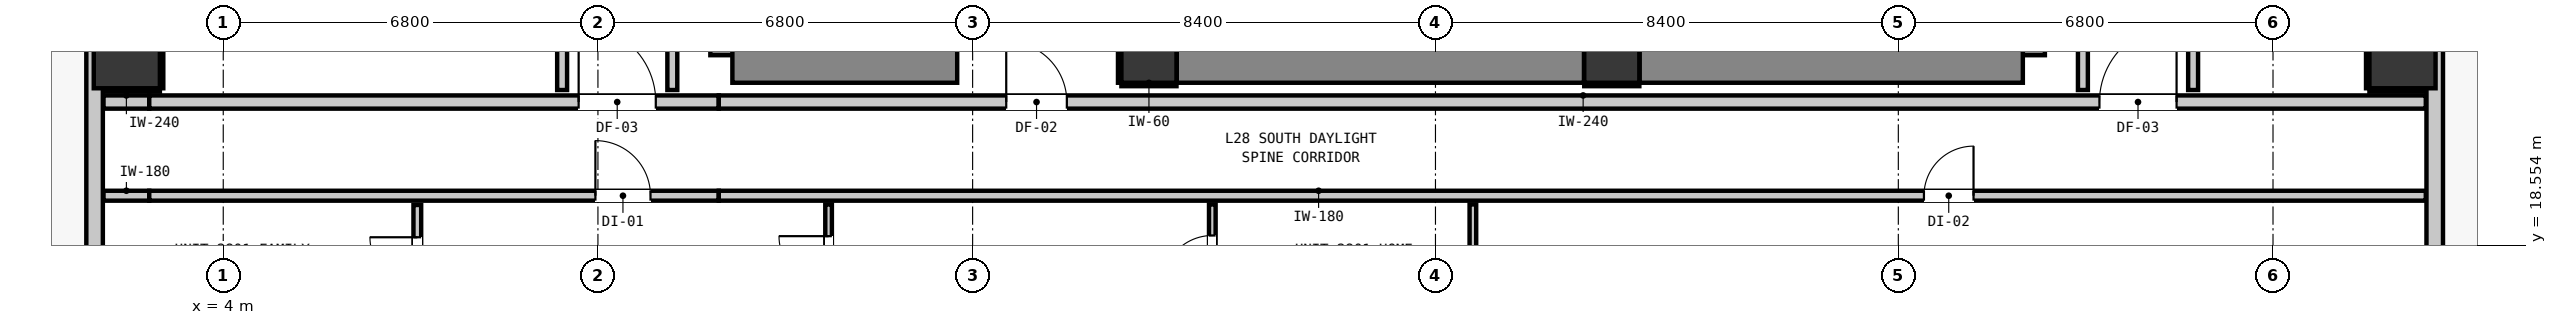
"""IFC4 building model, lengths in metres.
Left out: names, types, materials, properties, quantities, classifications, styles, units other than length and angle.
Written with IfcOpenShell. Run it as: python <this file> out.ifc"""

import sys

from ifc_helpers import new_model, si_unit, direction, frame, frame_2d, origin, origin_2d, place, context, subcontext, project, spatial, rectangle, extrude, element, fill, save


model = new_model("IFC4")
c1 = context("Model", 3, precision=1e-05, world=origin(), true_north=direction((0.0, 1.0)))
c2 = subcontext(c1, "Body", "Model", "MODEL_VIEW")
j1 = project(units=[si_unit("LENGTHUNIT", "METRE"), si_unit("PLANEANGLEUNIT", "RADIAN")], contexts=[c1])
p1 = place(None, origin())
s1 = spatial("IfcSite", under=j1, at=p1, CompositionType="ELEMENT")
p2 = place(p1, origin())
s2 = spatial("IfcBuilding", under=s1, at=p2, CompositionType="ELEMENT")
p3 = place(p2, frame((0.0, 0.0, 99.44)))
s3 = spatial("IfcBuildingStorey", under=s2, at=p3, CompositionType="ELEMENT", Elevation=99.44)
for number, where, z_axis, x_axis in (
    (1, (20.8, 22.0, 0.0), (0.0, 0.0, 1.0), (1.0, 0.0, 0.0)),
    (2, (29.2, 22.0, 0.0), (0.0, 0.0, 1.0), (1.0, 0.0, 0.0)),
):
    element("IfcColumn", number, at=place(p3, frame(where, z_axis=z_axis, x_axis=x_axis)), inside=s3, PredefinedType="COLUMN", context=c2, shape_type="SweptSolid", body=[
        extrude(rectangle(XDim=1.0, YDim=1.0, at=origin_2d()), origin(), (0.0, 0.0, 1.0), 3.32),
    ])
p4 = place(p3, frame((13.34, 22.0, 0.0), z_axis=(0.0, 0.0, 1.0), x_axis=(0.0, 1.0, 0.0)))
e3 = element("IfcWall", 3, at=p4, inside=s3, PredefinedType="SHEAR", context=c2, shape_type="SweptSolid", body=[
    extrude(rectangle(XDim=8.195, YDim=1.0, at=frame_2d((4.098, 0.0))), origin(), (0.0, 0.0, 1.0), 3.32),
])
p5 = place(p3, frame((13.24, 22.0, 0.0), z_axis=(0.0, 0.0, 1.0), x_axis=(1.0, 0.0, 0.0)))
e4 = element("IfcWall", 4, at=p5, inside=s3, PredefinedType="SHEAR", context=c2, shape_type="SweptSolid", body=[
    extrude(rectangle(XDim=4.08, YDim=1.0, at=frame_2d((2.04, 0.0))), origin(), (0.0, 0.0, 1.0), 3.32),
])
p6 = place(p3, frame((36.56, 22.0, 0.0), z_axis=(0.0, 0.0, 1.0), x_axis=(0.0, 1.0, 0.0)))
e5 = element("IfcWall", 5, at=p6, inside=s3, PredefinedType="SHEAR", context=c2, shape_type="SweptSolid", body=[
    extrude(rectangle(XDim=8.195, YDim=1.0, at=frame_2d((4.098, 0.0))), origin(), (0.0, 0.0, 1.0), 3.32),
])
p7 = place(p3, frame((29.705, 22.0, 0.0), z_axis=(0.0, 0.0, 1.0), x_axis=(1.0, 0.0, 0.0)))
e6 = element("IfcWall", 6, at=p7, inside=s3, PredefinedType="SHEAR", context=c2, shape_type="SweptSolid", body=[
    extrude(rectangle(XDim=6.955, YDim=1.0, at=frame_2d((3.478, 0.0))), origin(), (0.0, 0.0, 1.0), 3.32),
])
p8 = place(p3, frame((21.305, 22.0, 0.0), z_axis=(0.0, 0.0, 1.0), x_axis=(1.0, 0.0, 0.0)))
e7 = element("IfcWall", 7, at=p8, inside=s3, PredefinedType="SHEAR", context=c2, shape_type="SweptSolid", body=[
    extrude(rectangle(XDim=7.39, YDim=1.0, at=frame_2d((3.695, 0.0))), origin(), (0.0, 0.0, 1.0), 3.32),
])
for number, where, z_axis, x_axis in (
    (8, (2.25, 22.0, 0.0), (0.0, 0.0, 1.0), (1.0, 0.0, 0.0)),
    (9, (43.55, 22.0, 0.0), (0.0, 0.0, 1.0), (1.0, 0.0, 0.0)),
):
    element("IfcColumn", number, at=place(p3, frame(where, z_axis=z_axis, x_axis=x_axis)), inside=s3, PredefinedType="COLUMN", context=c2, shape_type="SweptSolid", body=[
        extrude(rectangle(XDim=1.2, YDim=1.2, at=origin_2d()), origin(), (0.0, 0.0, 1.0), 3.32),
    ])
p9 = place(p3, frame((1.665, 16.365, 0.0), z_axis=(0.0, 0.0, 1.0), x_axis=(0.0, 1.0, 0.0)))
e10 = element("IfcWall", 10, at=p9, inside=s3, PredefinedType="STANDARD", context=c2, shape_type="SweptSolid", body=[
    extrude(rectangle(XDim=34.67, YDim=0.3, at=frame_2d((17.335, 0.0))), origin(), (0.0, 0.0, 1.0), 3.06),
])
p10 = place(p9, frame((8.955, 0.0, 0.0)))
e11 = element("IfcOpeningElement", 11, at=p10, cuts=e10, PredefinedType="OPENING", context=c2, shape_type="SweptSolid", body=[
    extrude(rectangle(XDim=1.0, YDim=2.15, at=frame_2d((0.5, 1.075))), frame((0.0, 0.16, 0.0), z_axis=(0.0, -1.0, 0.0), x_axis=(1.0, 0.0, 0.0)), (0.0, 0.0, 1.0), 0.32),
])
p11 = place(p9, frame((31.033, 0.0, 0.85)))
e12 = element("IfcOpeningElement", 12, at=p11, cuts=e10, PredefinedType="OPENING", context=c2, shape_type="SweptSolid", body=[
    extrude(rectangle(XDim=0.9, YDim=1.5, at=frame_2d((0.45, 0.75))), frame((0.0, 0.16, 0.0), z_axis=(0.0, -1.0, 0.0), x_axis=(1.0, 0.0, 0.0)), (0.0, 0.0, 1.0), 0.32),
])
p12 = place(p9, frame((10.955, 0.0, 0.85)))
e13 = element("IfcOpeningElement", 13, at=p12, cuts=e10, PredefinedType="OPENING", context=c2, shape_type="SweptSolid", body=[
    extrude(rectangle(XDim=0.9, YDim=1.5, at=frame_2d((0.45, 0.75))), frame((0.0, 0.16, 0.0), z_axis=(0.0, -1.0, 0.0), x_axis=(1.0, 0.0, 0.0)), (0.0, 0.0, 1.0), 0.32),
])
p13 = place(p9, frame((15.485, 0.0, 0.85)))
e14 = element("IfcOpeningElement", 14, at=p13, cuts=e10, PredefinedType="OPENING", context=c2, shape_type="SweptSolid", body=[
    extrude(rectangle(XDim=0.9, YDim=1.5, at=frame_2d((0.45, 0.75))), frame((0.0, 0.16, 0.0), z_axis=(0.0, -1.0, 0.0), x_axis=(1.0, 0.0, 0.0)), (0.0, 0.0, 1.0), 0.32),
])
p14 = place(p3, frame((44.135, 51.035, 0.0), z_axis=(0.0, 0.0, 1.0), x_axis=(0.0, -1.0, 0.0)))
e15 = element("IfcWall", 15, at=p14, inside=s3, PredefinedType="STANDARD", context=c2, shape_type="SweptSolid", body=[
    extrude(rectangle(XDim=34.67, YDim=0.3, at=frame_2d((17.335, 0.0))), origin(), (0.0, 0.0, 1.0), 3.06),
])
p15 = place(p14, frame((0.901, 0.0, 0.0)))
e16 = element("IfcOpeningElement", 16, at=p15, cuts=e15, PredefinedType="OPENING", context=c2, shape_type="SweptSolid", body=[
    extrude(rectangle(XDim=1.0, YDim=2.15, at=frame_2d((0.5, 1.075))), frame((0.0, 0.16, 0.0), z_axis=(0.0, -1.0, 0.0), x_axis=(1.0, 0.0, 0.0)), (0.0, 0.0, 1.0), 0.32),
])
p16 = place(p14, frame((32.682, 0.0, 0.85)))
e17 = element("IfcOpeningElement", 17, at=p16, cuts=e15, PredefinedType="OPENING", context=c2, shape_type="SweptSolid", body=[
    extrude(rectangle(XDim=0.9, YDim=1.5, at=frame_2d((0.45, 0.75))), frame((0.0, 0.16, 0.0), z_axis=(0.0, -1.0, 0.0), x_axis=(1.0, 0.0, 0.0)), (0.0, 0.0, 1.0), 0.32),
])
p17 = place(p14, frame((23.323, 0.0, 0.85)))
e18 = element("IfcOpeningElement", 18, at=p17, cuts=e15, PredefinedType="OPENING", context=c2, shape_type="SweptSolid", body=[
    extrude(rectangle(XDim=0.9, YDim=1.5, at=frame_2d((0.45, 0.75))), frame((0.0, 0.16, 0.0), z_axis=(0.0, -1.0, 0.0), x_axis=(1.0, 0.0, 0.0)), (0.0, 0.0, 1.0), 0.32),
])
p18 = place(p3, frame((1.827, 21.15, 0.0), z_axis=(0.0, 0.0, 1.0), x_axis=(1.0, 0.0, 0.0)))
e19 = element("IfcWall", 19, at=p18, inside=s3, PredefinedType="PARTITIONING", context=c2, shape_type="SweptSolid", body=[
    extrude(rectangle(XDim=0.83, YDim=0.24, at=frame_2d((0.415, 0.0))), origin(), (0.0, 0.0, 1.0), 3.06),
])
p19 = place(p3, frame((2.657, 21.15, 0.0), z_axis=(0.0, 0.0, 1.0), x_axis=(1.0, 0.0, 0.0)))
e20 = element("IfcWall", 20, at=p19, inside=s3, PredefinedType="PARTITIONING", context=c2, shape_type="SweptSolid", body=[
    extrude(rectangle(XDim=10.336, YDim=0.24, at=frame_2d((5.168, 0.0))), origin(), (0.0, 0.0, 1.0), 2.445),
])
p20 = place(p19, frame((7.793, 0.0, 0.0)))
e21 = element("IfcOpeningElement", 21, at=p20, cuts=e20, PredefinedType="OPENING", context=c2, shape_type="SweptSolid", body=[
    extrude(rectangle(XDim=1.4, YDim=2.15, at=frame_2d((0.7, 1.075))), frame((0.0, 0.13, 0.0), z_axis=(0.0, -1.0, 0.0), x_axis=(1.0, 0.0, 0.0)), (0.0, 0.0, 1.0), 0.26),
])
p21 = place(p3, frame((12.993, 21.15, 0.0), z_axis=(0.0, 0.0, 1.0), x_axis=(1.0, 0.0, 0.0)))
e22 = element("IfcWall", 22, at=p21, inside=s3, PredefinedType="PARTITIONING", context=c2, shape_type="SweptSolid", body=[
    extrude(rectangle(XDim=30.98, YDim=0.24, at=frame_2d((15.49, 0.0))), origin(), (0.0, 0.0, 1.0), 3.06),
])
p22 = place(p21, frame((5.217, 0.0, 0.0)))
e23 = element("IfcOpeningElement", 23, at=p22, cuts=e22, PredefinedType="OPENING", context=c2, shape_type="SweptSolid", body=[
    extrude(rectangle(XDim=1.1, YDim=2.15, at=frame_2d((0.55, 1.075))), frame((0.0, 0.13, 0.0), z_axis=(0.0, -1.0, 0.0), x_axis=(1.0, 0.0, 0.0)), (0.0, 0.0, 1.0), 0.26),
])
p23 = place(p21, frame((25.057, 0.0, 0.0)))
e24 = element("IfcOpeningElement", 24, at=p23, cuts=e22, PredefinedType="OPENING", context=c2, shape_type="SweptSolid", body=[
    extrude(rectangle(XDim=1.4, YDim=2.15, at=frame_2d((0.7, 1.075))), frame((0.0, 0.13, 0.0), z_axis=(0.0, -1.0, 0.0), x_axis=(1.0, 0.0, 0.0)), (0.0, 0.0, 1.0), 0.26),
])
p24 = place(p3, frame((1.827, 19.45, 0.0), z_axis=(0.0, 0.0, 1.0), x_axis=(1.0, 0.0, 0.0)))
e25 = element("IfcWall", 25, at=p24, inside=s3, PredefinedType="PARTITIONING", context=c2, shape_type="SweptSolid", body=[
    extrude(rectangle(XDim=0.83, YDim=0.18, at=frame_2d((0.415, 0.0))), origin(), (0.0, 0.0, 1.0), 3.06),
])
p25 = place(p3, frame((2.657, 19.45, 0.0), z_axis=(0.0, 0.0, 1.0), x_axis=(1.0, 0.0, 0.0)))
e26 = element("IfcWall", 26, at=p25, inside=s3, PredefinedType="PARTITIONING", context=c2, shape_type="SweptSolid", body=[
    extrude(rectangle(XDim=10.336, YDim=0.18, at=frame_2d((5.168, 0.0))), origin(), (0.0, 0.0, 1.0), 2.445),
])
p26 = place(p25, frame((8.097, 0.0, 0.0)))
e27 = element("IfcOpeningElement", 27, at=p26, cuts=e26, PredefinedType="OPENING", context=c2, shape_type="SweptSolid", body=[
    extrude(rectangle(XDim=1.0, YDim=2.15, at=frame_2d((0.5, 1.075))), frame((0.0, 0.1, 0.0), z_axis=(0.0, -1.0, 0.0), x_axis=(1.0, 0.0, 0.0)), (0.0, 0.0, 1.0), 0.2),
])
p27 = place(p3, frame((12.993, 19.45, 0.0), z_axis=(0.0, 0.0, 1.0), x_axis=(1.0, 0.0, 0.0)))
e28 = element("IfcWall", 28, at=p27, inside=s3, PredefinedType="PARTITIONING", context=c2, shape_type="SweptSolid", body=[
    extrude(rectangle(XDim=30.98, YDim=0.18, at=frame_2d((15.49, 0.0))), origin(), (0.0, 0.0, 1.0), 3.06),
])
p28 = place(p27, frame((21.872, 0.0, 0.0)))
e29 = element("IfcOpeningElement", 29, at=p28, cuts=e28, PredefinedType="OPENING", context=c2, shape_type="SweptSolid", body=[
    extrude(rectangle(XDim=0.9, YDim=2.1, at=frame_2d((0.45, 1.05))), frame((0.0, 0.1, 0.0), z_axis=(0.0, -1.0, 0.0), x_axis=(1.0, 0.0, 0.0)), (0.0, 0.0, 1.0), 0.2),
])
p29 = place(p3, frame((10.15, 21.368, 0.0), z_axis=(0.0, 0.0, 1.0), x_axis=(0.0, 1.0, 0.0)))
e30 = element("IfcWall", 30, at=p29, inside=s3, PredefinedType="PARTITIONING", context=c2, shape_type="SweptSolid", body=[
    extrude(rectangle(XDim=3.109, YDim=0.18, at=frame_2d((1.555, 0.0))), origin(), (0.0, 0.0, 1.0), 3.06),
])
for number, where, z_axis, x_axis in (
    (31, (12.15, 21.368, 0.0), (0.0, 0.0, 1.0), (0.0, 1.0, 0.0)),
    (32, (37.75, 21.368, 0.0), (0.0, 0.0, 1.0), (0.0, 1.0, 0.0)),
):
    element("IfcWall", number, at=place(p3, frame(where, z_axis=z_axis, x_axis=x_axis)), inside=s3, PredefinedType="PARTITIONING", context=c2, shape_type="SweptSolid", body=[
        extrude(rectangle(XDim=18.694, YDim=0.18, at=frame_2d((9.347, 0.0))), origin(), (0.0, 0.0, 1.0), 3.06),
    ])
p30 = place(p3, frame((39.75, 21.368, 0.0), z_axis=(0.0, 0.0, 1.0), x_axis=(0.0, 1.0, 0.0)))
e33 = element("IfcWall", 33, at=p30, inside=s3, PredefinedType="PARTITIONING", context=c2, shape_type="SweptSolid", body=[
    extrude(rectangle(XDim=3.109, YDim=0.18, at=frame_2d((1.555, 0.0))), origin(), (0.0, 0.0, 1.0), 3.06),
])
p31 = place(p3, frame((7.522, 17.255, 0.0), z_axis=(0.0, 0.0, 1.0), x_axis=(0.0, 1.0, 0.0)))
e34 = element("IfcWall", 34, at=p31, inside=s3, PredefinedType="PARTITIONING", context=c2, shape_type="SweptSolid", body=[
    extrude(rectangle(XDim=2.027, YDim=0.14, at=frame_2d((1.014, 0.0))), origin(), (0.0, 0.0, 1.0), 3.06),
])
p32 = place(p31, frame((0.581, 0.0, 0.0)))
e35 = element("IfcOpeningElement", 35, at=p32, cuts=e34, PredefinedType="OPENING", context=c2, shape_type="SweptSolid", body=[
    extrude(rectangle(XDim=0.86, YDim=2.02, at=frame_2d((0.43, 1.01))), frame((0.0, 0.08, 0.0), z_axis=(0.0, -1.0, 0.0), x_axis=(1.0, 0.0, 0.0)), (0.0, 0.0, 1.0), 0.16),
])
p33 = place(p3, frame((14.986, 17.245, 0.0), z_axis=(0.0, 0.0, 1.0), x_axis=(0.0, 1.0, 0.0)))
e36 = element("IfcWall", 36, at=p33, inside=s3, PredefinedType="PARTITIONING", context=c2, shape_type="SweptSolid", body=[
    extrude(rectangle(XDim=2.047, YDim=0.12, at=frame_2d((1.023, 0.0))), origin(), (0.0, 0.0, 1.0), 3.06),
])
p34 = place(p33, frame((0.571, 0.0, 0.0)))
e37 = element("IfcOpeningElement", 37, at=p34, cuts=e36, PredefinedType="OPENING", context=c2, shape_type="SweptSolid", body=[
    extrude(rectangle(XDim=0.9, YDim=2.1, at=frame_2d((0.45, 1.05))), frame((0.0, 0.07, 0.0), z_axis=(0.0, -1.0, 0.0), x_axis=(1.0, 0.0, 0.0)), (0.0, 0.0, 1.0), 0.14),
])
p35 = place(p3, frame((21.95, 17.245, 0.0), z_axis=(0.0, 0.0, 1.0), x_axis=(0.0, 1.0, 0.0)))
e38 = element("IfcWall", 38, at=p35, inside=s3, PredefinedType="PARTITIONING", context=c2, shape_type="SweptSolid", body=[
    extrude(rectangle(XDim=2.047, YDim=0.12, at=frame_2d((1.023, 0.0))), origin(), (0.0, 0.0, 1.0), 3.06),
])
p36 = place(p35, frame((0.583, 0.0, 0.0)))
e39 = element("IfcOpeningElement", 39, at=p36, cuts=e38, PredefinedType="OPENING", context=c2, shape_type="SweptSolid", body=[
    extrude(rectangle(XDim=0.9, YDim=2.1, at=frame_2d((0.45, 1.05))), frame((0.0, 0.07, 0.0), z_axis=(0.0, -1.0, 0.0), x_axis=(1.0, 0.0, 0.0)), (0.0, 0.0, 1.0), 0.14),
])
p37 = place(p3, frame((26.679, 17.245, 0.0), z_axis=(0.0, 0.0, 1.0), x_axis=(0.0, 1.0, 0.0)))
e40 = element("IfcWall", 40, at=p37, inside=s3, PredefinedType="PARTITIONING", context=c2, shape_type="SweptSolid", body=[
    extrude(rectangle(XDim=2.047, YDim=0.12, at=frame_2d((1.023, 0.0))), origin(), (0.0, 0.0, 1.0), 3.06),
])
for number, where, z_axis, x_axis in (
    (41, (20.3, 21.468, 0.0), (0.0, 0.0, 1.0), (1.0, 0.0, 0.0)),
    (42, (20.268, 21.5, 0.0), (0.0, 0.0, 1.0), (0.0, 1.0, 0.0)),
    (43, (28.7, 21.468, 0.0), (0.0, 0.0, 1.0), (1.0, 0.0, 0.0)),
):
    element("IfcWall", number, at=place(p3, frame(where, z_axis=z_axis, x_axis=x_axis)), inside=s3, PredefinedType="PARTITIONING", context=c2, shape_type="SweptSolid", body=[
        extrude(rectangle(XDim=1.0, YDim=0.06, at=frame_2d((0.5, 0.0))), origin(), (0.0, 0.0, 1.0), 1.45),
    ])
p38 = place(p3, frame((1.83, 21.368, 0.0), z_axis=(0.0, 0.0, 1.0), x_axis=(1.0, 0.0, 0.0)))
e44 = element("IfcWall", 44, at=p38, inside=s3, PredefinedType="PARTITIONING", context=c2, shape_type="SweptSolid", body=[
    extrude(rectangle(XDim=1.02, YDim=0.06, at=frame_2d((0.51, 0.0))), origin(), (0.0, 0.0, 1.0), 1.45),
])
p39 = place(p3, frame((2.882, 21.4, 0.0), z_axis=(0.0, 0.0, 1.0), x_axis=(0.0, 1.0, 0.0)))
e45 = element("IfcWall", 45, at=p39, inside=s3, PredefinedType="PARTITIONING", context=c2, shape_type="SweptSolid", body=[
    extrude(rectangle(XDim=1.2, YDim=0.06, at=frame_2d((0.6, 0.0))), origin(), (0.0, 0.0, 1.0), 1.45),
])
p40 = place(p3, frame((42.95, 21.368, 0.0), z_axis=(0.0, 0.0, 1.0), x_axis=(1.0, 0.0, 0.0)))
e46 = element("IfcWall", 46, at=p40, inside=s3, PredefinedType="PARTITIONING", context=c2, shape_type="SweptSolid", body=[
    extrude(rectangle(XDim=1.02, YDim=0.06, at=frame_2d((0.51, 0.0))), origin(), (0.0, 0.0, 1.0), 1.45),
])
p41 = place(p3, frame((42.918, 21.4, 0.0), z_axis=(0.0, 0.0, 1.0), x_axis=(0.0, 1.0, 0.0)))
e47 = element("IfcWall", 47, at=p41, inside=s3, PredefinedType="PARTITIONING", context=c2, shape_type="SweptSolid", body=[
    extrude(rectangle(XDim=1.2, YDim=0.06, at=frame_2d((0.6, 0.0))), origin(), (0.0, 0.0, 1.0), 1.45),
])
p42 = place(p22, origin())
e48 = element("IfcDoor", 48, at=p42, inside=s3, OperationType="SINGLE_SWING_LEFT", PredefinedType="DOOR", context=c2, shape_type="SweptSolid", body=[
    extrude(rectangle(XDim=1.1, YDim=2.15, at=frame_2d((0.55, 1.075))), frame((0.0, 0.025, 0.0), z_axis=(0.0, -1.0, 0.0), x_axis=(1.0, 0.0, 0.0)), (0.0, 0.0, 1.0), 0.05),
])
fill(e23, e48)
p43 = place(p20, origin())
e49 = element("IfcDoor", 49, at=p43, inside=s3, OperationType="SINGLE_SWING_LEFT", PredefinedType="DOOR", context=c2, shape_type="SweptSolid", body=[
    extrude(rectangle(XDim=1.4, YDim=2.15, at=frame_2d((0.7, 1.075))), frame((0.0, 0.025, 0.0), z_axis=(0.0, -1.0, 0.0), x_axis=(1.0, 0.0, 0.0)), (0.0, 0.0, 1.0), 0.05),
])
fill(e21, e49)
p44 = place(p23, origin())
e50 = element("IfcDoor", 50, at=p44, inside=s3, OperationType="SINGLE_SWING_RIGHT", PredefinedType="DOOR", context=c2, shape_type="SweptSolid", body=[
    extrude(rectangle(XDim=1.4, YDim=2.15, at=frame_2d((0.7, 1.075))), frame((0.0, 0.025, 0.0), z_axis=(0.0, -1.0, 0.0), x_axis=(1.0, 0.0, 0.0)), (0.0, 0.0, 1.0), 0.05),
])
fill(e24, e50)
p45 = place(p26, origin())
e51 = element("IfcDoor", 51, at=p45, inside=s3, OperationType="SINGLE_SWING_LEFT", PredefinedType="DOOR", context=c2, shape_type="SweptSolid", body=[
    extrude(rectangle(XDim=1.0, YDim=2.15, at=frame_2d((0.5, 1.075))), frame((0.0, 0.025, 0.0), z_axis=(0.0, -1.0, 0.0), x_axis=(1.0, 0.0, 0.0)), (0.0, 0.0, 1.0), 0.05),
])
fill(e27, e51)
p46 = place(p32, origin())
e52 = element("IfcDoor", 52, at=p46, inside=s3, OperationType="SINGLE_SWING_RIGHT", PredefinedType="DOOR", context=c2, shape_type="SweptSolid", body=[
    extrude(rectangle(XDim=0.86, YDim=2.02, at=frame_2d((0.43, 1.01))), frame((0.0, 0.025, 0.0), z_axis=(0.0, -1.0, 0.0), x_axis=(1.0, 0.0, 0.0)), (0.0, 0.0, 1.0), 0.05),
])
fill(e35, e52)
p47 = place(p34, origin())
e53 = element("IfcDoor", 53, at=p47, inside=s3, OperationType="SINGLE_SWING_RIGHT", PredefinedType="DOOR", context=c2, shape_type="SweptSolid", body=[
    extrude(rectangle(XDim=0.9, YDim=2.1, at=frame_2d((0.45, 1.05))), frame((0.0, 0.025, 0.0), z_axis=(0.0, -1.0, 0.0), x_axis=(1.0, 0.0, 0.0)), (0.0, 0.0, 1.0), 0.05),
])
fill(e37, e53)
p48 = place(p36, origin())
e54 = element("IfcDoor", 54, at=p48, inside=s3, OperationType="SINGLE_SWING_LEFT", PredefinedType="DOOR", context=c2, shape_type="SweptSolid", body=[
    extrude(rectangle(XDim=0.9, YDim=2.1, at=frame_2d((0.45, 1.05))), frame((0.0, 0.025, 0.0), z_axis=(0.0, -1.0, 0.0), x_axis=(1.0, 0.0, 0.0)), (0.0, 0.0, 1.0), 0.05),
])
fill(e39, e54)
p49 = place(p28, origin())
e55 = element("IfcDoor", 55, at=p49, inside=s3, OperationType="SINGLE_SWING_RIGHT", PredefinedType="DOOR", context=c2, shape_type="SweptSolid", body=[
    extrude(rectangle(XDim=0.9, YDim=2.1, at=frame_2d((0.45, 1.05))), frame((0.0, 0.025, 0.0), z_axis=(0.0, -1.0, 0.0), x_axis=(1.0, 0.0, 0.0)), (0.0, 0.0, 1.0), 0.05),
])
fill(e29, e55)
save(model, sys.argv[1])
